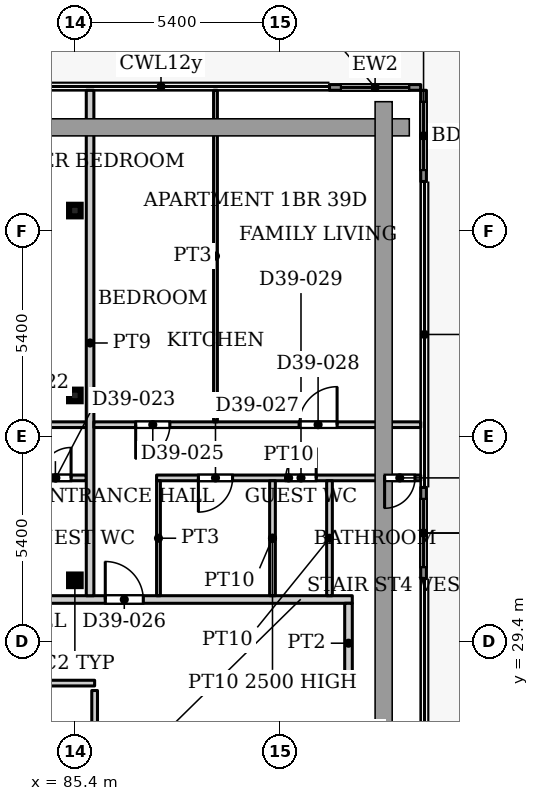
"""IFC4 building model, lengths in metres.
Left out: names, types, materials, properties, quantities, classifications, styles, units other than length and angle.
Written with IfcOpenShell. Run it as: python <this file> out.ifc"""

import sys

from ifc_helpers import new_model, si_unit, direction, frame, frame_2d, origin, origin_2d, place, context, subcontext, project, spatial, rectangle, hollow_rectangle, extrude, source, transform, mapped, element, fill, save


model = new_model("IFC4")
c1 = context("Model", 3, precision=1e-05, world=origin(), true_north=direction((0.0, 1.0)))
c2 = subcontext(c1, "Body", "Model", "MODEL_VIEW")
j1 = project(units=[si_unit("LENGTHUNIT", "METRE"), si_unit("PLANEANGLEUNIT", "RADIAN")], contexts=[c1])
p1 = place(None, origin())
s1 = spatial("IfcSite", under=j1, at=p1, CompositionType="ELEMENT")
p2 = place(p1, origin())
s2 = spatial("IfcBuilding", under=s1, at=p2, CompositionType="ELEMENT")
p3 = place(p2, frame((0.0, 0.0, 168.2)))
s3 = spatial("IfcBuildingStorey", under=s2, at=p3, CompositionType="ELEMENT", Elevation=168.2)
for number, where, z_axis, x_axis in (
    (1, (85.4, 31.005, 0.0), (0.0, 0.0, 1.0), (1.0, 0.0, 0.0)),
    (2, (85.4, 35.87, 0.0), (0.0, 0.0, 1.0), (1.0, 0.0, 0.0)),
    (3, (85.4, 40.735, 0.0), (0.0, 0.0, 1.0), (1.0, 0.0, 0.0)),
):
    element("IfcColumn", number, at=place(p3, frame(where, z_axis=z_axis, x_axis=x_axis)), inside=s3, PredefinedType="COLUMN", context=c2, shape_type="SweptSolid", body=[
        extrude(hollow_rectangle(XDim=0.305, YDim=0.305, WallThickness=0.016, InnerFilletRadius=0.016, OuterFilletRadius=0.032, at=origin_2d()), origin(), (0.0, 0.0, 1.0), 3.9),
    ])
p4 = place(p3, frame((92.1, 43.975, 0.0), z_axis=(0.0, 0.0, 1.0), x_axis=(1.0, 0.0, 0.0)))
e4 = element("IfcWall", 4, at=p4, inside=s3, PredefinedType="SOLIDWALL", context=c2, shape_type="SweptSolid", body=[
    extrude(rectangle(XDim=2.4, YDim=0.15, at=frame_2d((1.2, 0.0))), origin(), (0.0, 0.0, 1.0), 3.75),
])
p5 = place(p4, frame((0.3, 0.0, 0.0)))
e5 = element("IfcOpeningElement", 5, at=p5, cuts=e4, PredefinedType="OPENING", context=c2, shape_type="SweptSolid", body=[
    extrude(rectangle(XDim=1.8, YDim=2.4, at=frame_2d((0.9, 1.2))), frame((0.0, 0.085, 0.0), z_axis=(0.0, -1.0, 0.0), x_axis=(1.0, 0.0, 0.0)), (0.0, 0.0, 1.0), 0.17),
])
p6 = place(p3, frame((94.575, 43.9, 0.0), z_axis=(0.0, 0.0, 1.0), x_axis=(0.0, -1.0, 0.0)))
e6 = element("IfcWall", 6, at=p6, inside=s3, PredefinedType="SOLIDWALL", context=c2, shape_type="SweptSolid", body=[
    extrude(rectangle(XDim=2.4, YDim=0.15, at=frame_2d((1.2, 0.0))), origin(), (0.0, 0.0, 1.0), 3.75),
])
p7 = place(p6, frame((0.3, 0.0, 0.0)))
e7 = element("IfcOpeningElement", 7, at=p7, cuts=e6, PredefinedType="OPENING", context=c2, shape_type="SweptSolid", body=[
    extrude(rectangle(XDim=1.8, YDim=2.4, at=frame_2d((0.9, 1.2))), frame((0.0, 0.085, 0.0), z_axis=(0.0, -1.0, 0.0), x_axis=(1.0, 0.0, 0.0)), (0.0, 0.0, 1.0), 0.17),
])
p8 = place(p3, frame((94.575, 33.449, 0.0), z_axis=(0.0, 0.0, 1.0), x_axis=(0.0, -1.0, 0.0)))
e8 = element("IfcWall", 8, at=p8, inside=s3, PredefinedType="SOLIDWALL", context=c2, shape_type="SweptSolid", body=[
    extrude(rectangle(XDim=2.4, YDim=0.15, at=frame_2d((1.2, 0.0))), origin(), (0.0, 0.0, 1.0), 3.75),
])
p9 = place(p8, frame((0.3, 0.0, 0.0)))
e9 = element("IfcOpeningElement", 9, at=p9, cuts=e8, PredefinedType="OPENING", context=c2, shape_type="SweptSolid", body=[
    extrude(rectangle(XDim=1.8, YDim=2.4, at=frame_2d((0.9, 1.2))), frame((0.0, 0.085, 0.0), z_axis=(0.0, -1.0, 0.0), x_axis=(1.0, 0.0, 0.0)), (0.0, 0.0, 1.0), 0.17),
])
p10 = place(p3, frame((81.441, 28.3, 0.0), z_axis=(0.0, 0.0, 1.0), x_axis=(1.0, 0.0, 0.0)))
e10 = element("IfcWall", 10, at=p10, inside=s3, PredefinedType="PARTITIONING", context=c2, shape_type="SweptSolid", body=[
    extrude(rectangle(XDim=4.479, YDim=0.15, at=frame_2d((2.24, 0.0))), origin(), (0.0, 0.0, 1.0), 3.9),
])
p11 = place(p10, frame((1.789, 0.0, 0.0)))
e11 = element("IfcOpeningElement", 11, at=p11, cuts=e10, PredefinedType="OPENING", context=c2, shape_type="SweptSolid", body=[
    extrude(rectangle(XDim=0.9, YDim=2.2, at=frame_2d((0.45, 1.1))), frame((0.0, 0.085, 0.0), z_axis=(0.0, -1.0, 0.0), x_axis=(1.0, 0.0, 0.0)), (0.0, 0.0, 1.0), 0.17),
])
p12 = place(p3, frame((85.92, 25.62, 0.0), z_axis=(0.0, 0.0, 1.0), x_axis=(0.0, 1.0, 0.0)))
e12 = element("IfcWall", 12, at=p12, inside=s3, PredefinedType="PARTITIONING", context=c2, shape_type="SweptSolid", body=[
    extrude(rectangle(XDim=2.485, YDim=0.15, at=frame_2d((1.242, 0.0))), origin(), (0.0, 0.0, 1.0), 3.9),
])
p13 = place(p3, frame((53.549, 30.5, 0.0), z_axis=(0.0, 0.0, 1.0), x_axis=(1.0, 0.0, 0.0)))
e13 = element("IfcWall", 13, at=p13, inside=s3, PredefinedType="PARTITIONING", context=c2, shape_type="SweptSolid", body=[
    extrude(rectangle(XDim=39.151, YDim=0.2, at=frame_2d((19.575, 0.0))), origin(), (0.0, 0.0, 1.0), 3.6),
])
p14 = place(p13, frame((2.801, 0.0, 0.0)))
e14 = element("IfcOpeningElement", 14, at=p14, cuts=e13, PredefinedType="OPENING", context=c2, shape_type="SweptSolid", body=[
    extrude(rectangle(XDim=1.0, YDim=2.1, at=frame_2d((0.5, 1.05))), frame((0.0, 0.11, 0.0), z_axis=(0.0, -1.0, 0.0), x_axis=(1.0, 0.0, 0.0)), (0.0, 0.0, 1.0), 0.22),
])
p15 = place(p13, frame((9.851, 0.0, 0.0)))
e15 = element("IfcOpeningElement", 15, at=p15, cuts=e13, PredefinedType="OPENING", context=c2, shape_type="SweptSolid", body=[
    extrude(rectangle(XDim=1.0, YDim=2.1, at=frame_2d((0.5, 1.05))), frame((0.0, 0.11, 0.0), z_axis=(0.0, -1.0, 0.0), x_axis=(1.0, 0.0, 0.0)), (0.0, 0.0, 1.0), 0.22),
])
p16 = place(p13, frame((28.751, 0.0, 0.0)))
e16 = element("IfcOpeningElement", 16, at=p16, cuts=e13, PredefinedType="OPENING", context=c2, shape_type="SweptSolid", body=[
    extrude(rectangle(XDim=1.0, YDim=2.1, at=frame_2d((0.5, 1.05))), frame((0.0, 0.11, 0.0), z_axis=(0.0, -1.0, 0.0), x_axis=(1.0, 0.0, 0.0)), (0.0, 0.0, 1.0), 0.22),
])
p17 = place(p13, frame((32.651, 0.0, 0.0)))
e17 = element("IfcOpeningElement", 17, at=p17, cuts=e13, PredefinedType="OPENING", context=c2, shape_type="SweptSolid", body=[
    extrude(rectangle(XDim=1.0, YDim=2.1, at=frame_2d((0.5, 1.05))), frame((0.0, 0.11, 0.0), z_axis=(0.0, -1.0, 0.0), x_axis=(1.0, 0.0, 0.0)), (0.0, 0.0, 1.0), 0.22),
])
p18 = place(p3, frame((75.4, 35.1, 0.0), z_axis=(0.0, 0.0, 1.0), x_axis=(1.0, 0.0, 0.0)))
e18 = element("IfcWall", 18, at=p18, inside=s3, PredefinedType="PARTITIONING", context=c2, shape_type="SweptSolid", body=[
    extrude(rectangle(XDim=10.3, YDim=0.15, at=frame_2d((5.15, 0.0))), origin(), (0.0, 0.0, 1.0), 3.6),
])
p19 = place(p18, frame((5.3, 0.0, 0.0)))
e19 = element("IfcOpeningElement", 19, at=p19, cuts=e18, PredefinedType="OPENING", context=c2, shape_type="SweptSolid", body=[
    extrude(rectangle(XDim=0.9, YDim=2.1, at=frame_2d((0.45, 1.05))), frame((0.0, 0.085, 0.0), z_axis=(0.0, -1.0, 0.0), x_axis=(1.0, 0.0, 0.0)), (0.0, 0.0, 1.0), 0.17),
])
p20 = place(p18, frame((1.65, 0.0, 0.0)))
e20 = element("IfcOpeningElement", 20, at=p20, cuts=e18, PredefinedType="OPENING", context=c2, shape_type="SweptSolid", body=[
    extrude(rectangle(XDim=1.0, YDim=2.1, at=frame_2d((0.5, 1.05))), frame((0.0, 0.085, 0.0), z_axis=(0.0, -1.0, 0.0), x_axis=(1.0, 0.0, 0.0)), (0.0, 0.0, 1.0), 0.17),
])
p21 = place(p18, frame((8.3, 0.0, 0.0)))
e21 = element("IfcOpeningElement", 21, at=p21, cuts=e18, PredefinedType="OPENING", context=c2, shape_type="SweptSolid", body=[
    extrude(rectangle(XDim=0.9, YDim=2.1, at=frame_2d((0.45, 1.05))), frame((0.0, 0.085, 0.0), z_axis=(0.0, -1.0, 0.0), x_axis=(1.0, 0.0, 0.0)), (0.0, 0.0, 1.0), 0.17),
])
p22 = place(p3, frame((84.075, 33.7, 0.0), z_axis=(0.0, 0.0, 1.0), x_axis=(1.0, 0.0, 0.0)))
e22 = element("IfcWall", 22, at=p22, inside=s3, PredefinedType="PARTITIONING", context=c2, shape_type="SweptSolid", body=[
    extrude(rectangle(XDim=1.625, YDim=0.15, at=frame_2d((0.812, 0.0))), origin(), (0.0, 0.0, 1.0), 3.6),
])
p23 = place(p22, frame((0.425, 0.0, 0.0)))
e23 = element("IfcOpeningElement", 23, at=p23, cuts=e22, PredefinedType="OPENING", context=c2, shape_type="SweptSolid", body=[
    extrude(rectangle(XDim=0.8, YDim=2.1, at=frame_2d((0.4, 1.05))), frame((0.0, 0.085, 0.0), z_axis=(0.0, -1.0, 0.0), x_axis=(1.0, 0.0, 0.0)), (0.0, 0.0, 1.0), 0.17),
])
p24 = place(p3, frame((85.8, 30.6, 0.0), z_axis=(0.0, 0.0, 1.0), x_axis=(0.0, 1.0, 0.0)))
e24 = element("IfcWall", 24, at=p24, inside=s3, PredefinedType="PARTITIONING", context=c2, shape_type="SweptSolid", body=[
    extrude(rectangle(XDim=13.3, YDim=0.2, at=frame_2d((6.65, 0.0))), origin(), (0.0, 0.0, 1.0), 3.6),
])
p25 = place(p3, frame((85.9, 35.1, 0.0), z_axis=(0.0, 0.0, 1.0), x_axis=(1.0, 0.0, 0.0)))
e25 = element("IfcWall", 25, at=p25, inside=s3, PredefinedType="PARTITIONING", context=c2, shape_type="SweptSolid", body=[
    extrude(rectangle(XDim=8.6, YDim=0.15, at=frame_2d((4.3, 0.0))), origin(), (0.0, 0.0, 1.0), 3.6),
])
p26 = place(p25, frame((1.1, 0.0, 0.0)))
e26 = element("IfcOpeningElement", 26, at=p26, cuts=e25, PredefinedType="OPENING", context=c2, shape_type="SweptSolid", body=[
    extrude(rectangle(XDim=0.9, YDim=2.1, at=frame_2d((0.45, 1.05))), frame((0.0, 0.085, 0.0), z_axis=(0.0, -1.0, 0.0), x_axis=(1.0, 0.0, 0.0)), (0.0, 0.0, 1.0), 0.17),
])
p27 = place(p25, frame((5.4, 0.0, 0.0)))
e27 = element("IfcOpeningElement", 27, at=p27, cuts=e25, PredefinedType="OPENING", context=c2, shape_type="SweptSolid", body=[
    extrude(rectangle(XDim=1.0, YDim=2.1, at=frame_2d((0.5, 1.05))), frame((0.0, 0.085, 0.0), z_axis=(0.0, -1.0, 0.0), x_axis=(1.0, 0.0, 0.0)), (0.0, 0.0, 1.0), 0.17),
])
p28 = place(p3, frame((87.55, 33.7, 0.0), z_axis=(0.0, 0.0, 1.0), x_axis=(1.0, 0.0, 0.0)))
e28 = element("IfcWall", 28, at=p28, inside=s3, PredefinedType="PARTITIONING", context=c2, shape_type="SweptSolid", body=[
    extrude(rectangle(XDim=6.95, YDim=0.15, at=frame_2d((3.475, 0.0))), origin(), (0.0, 0.0, 1.0), 3.6),
])
p29 = place(p28, frame((6.0, 0.0, 0.0)))
e29 = element("IfcOpeningElement", 29, at=p29, cuts=e28, PredefinedType="OPENING", context=c2, shape_type="SweptSolid", body=[
    extrude(rectangle(XDim=0.8, YDim=2.1, at=frame_2d((0.4, 1.05))), frame((0.0, 0.085, 0.0), z_axis=(0.0, -1.0, 0.0), x_axis=(1.0, 0.0, 0.0)), (0.0, 0.0, 1.0), 0.17),
])
p30 = place(p28, frame((1.1, 0.0, 0.0)))
e30 = element("IfcOpeningElement", 30, at=p30, cuts=e28, PredefinedType="OPENING", context=c2, shape_type="SweptSolid", body=[
    extrude(rectangle(XDim=0.9, YDim=2.1, at=frame_2d((0.45, 1.05))), frame((0.0, 0.085, 0.0), z_axis=(0.0, -1.0, 0.0), x_axis=(1.0, 0.0, 0.0)), (0.0, 0.0, 1.0), 0.17),
])
p31 = place(p28, frame((3.4, 0.0, 0.0)))
e31 = element("IfcOpeningElement", 31, at=p31, cuts=e28, PredefinedType="OPENING", context=c2, shape_type="SweptSolid", body=[
    extrude(rectangle(XDim=0.8, YDim=2.1, at=frame_2d((0.4, 1.05))), frame((0.0, 0.085, 0.0), z_axis=(0.0, -1.0, 0.0), x_axis=(1.0, 0.0, 0.0)), (0.0, 0.0, 1.0), 0.17),
])
p32 = place(p3, frame((87.6, 30.6, 0.0), z_axis=(0.0, 0.0, 1.0), x_axis=(0.0, 1.0, 0.0)))
e32 = element("IfcWall", 32, at=p32, inside=s3, PredefinedType="PARTITIONING", context=c2, shape_type="SweptSolid", body=[
    extrude(rectangle(XDim=3.025, YDim=0.1, at=frame_2d((1.512, 0.0))), origin(), (0.0, 0.0, 1.0), 3.6),
])
p33 = place(p3, frame((89.1, 35.175, 0.0), z_axis=(0.0, 0.0, 1.0), x_axis=(0.0, 1.0, 0.0)))
e33 = element("IfcWall", 33, at=p33, inside=s3, PredefinedType="PARTITIONING", context=c2, shape_type="SweptSolid", body=[
    extrude(rectangle(XDim=8.725, YDim=0.1, at=frame_2d((4.362, 0.0))), origin(), (0.0, 0.0, 1.0), 3.6),
])
p34 = place(p3, frame((90.6, 30.6, 0.0), z_axis=(0.0, 0.0, 1.0), x_axis=(0.0, 1.0, 0.0)))
e34 = element("IfcWall", 34, at=p34, inside=s3, PredefinedType="PARTITIONING", context=c2, shape_type="SweptSolid", body=[
    extrude(rectangle(XDim=3.025, YDim=0.15, at=frame_2d((1.512, 0.0))), origin(), (0.0, 0.0, 1.0), 2.5),
])
p35 = place(p3, frame((92.1, 30.6, 0.0), z_axis=(0.0, 0.0, 1.0), x_axis=(0.0, 1.0, 0.0)))
e35 = element("IfcWall", 35, at=p35, inside=s3, PredefinedType="PARTITIONING", context=c2, shape_type="SweptSolid", body=[
    extrude(rectangle(XDim=3.025, YDim=0.15, at=frame_2d((1.512, 0.0))), origin(), (0.0, 0.0, 1.0), 3.6),
])
p36 = place(p3, frame((92.6, 28.3, 0.0), z_axis=(0.0, 0.0, 1.0), x_axis=(0.0, 1.0, 0.0)))
e36 = element("IfcWall", 36, at=p36, inside=s3, PredefinedType="PARTITIONING", context=c2, shape_type="SweptSolid", body=[
    extrude(rectangle(XDim=2.1, YDim=0.2, at=frame_2d((1.05, 0.0))), origin(), (0.0, 0.0, 1.0), 3.6),
])
m1 = source(origin(), c2, "Body", "SweptSolid", [
    extrude(rectangle(XDim=1.8, YDim=2.4, at=frame_2d((0.9, 1.2))), frame((0.0, 0.025, 0.0), z_axis=(0.0, -1.0, 0.0), x_axis=(1.0, 0.0, 0.0)), (0.0, 0.0, 1.0), 0.05),
])
p37 = place(p5, origin())
e37 = element("IfcDoor", 37, at=p37, inside=s3, OperationType="SLIDING_TO_LEFT", PredefinedType="DOOR", context=c2, shape_type="MappedRepresentation", body=[
    mapped(m1, transform((0.0, 0.0, 0.0), x_axis=(1.0, 0.0, 0.0), y_axis=(0.0, 1.0, 0.0), z_axis=(0.0, 0.0, 1.0), scale=1.0)),
])
fill(e5, e37)
p38 = place(p7, origin())
e38 = element("IfcDoor", 38, at=p38, inside=s3, OperationType="SLIDING_TO_LEFT", PredefinedType="DOOR", context=c2, shape_type="MappedRepresentation", body=[
    mapped(m1, transform((0.0, 0.0, 0.0), x_axis=(1.0, 0.0, 0.0), y_axis=(0.0, 1.0, 0.0), z_axis=(0.0, 0.0, 1.0), scale=1.0)),
])
fill(e7, e38)
p39 = place(p9, origin())
e39 = element("IfcDoor", 39, at=p39, inside=s3, OperationType="SLIDING_TO_LEFT", PredefinedType="DOOR", context=c2, shape_type="MappedRepresentation", body=[
    mapped(m1, transform((0.0, 0.0, 0.0), x_axis=(1.0, 0.0, 0.0), y_axis=(0.0, 1.0, 0.0), z_axis=(0.0, 0.0, 1.0), scale=1.0)),
])
fill(e9, e39)
m2 = source(origin(), c2, "Body", "SweptSolid", [
    extrude(rectangle(XDim=0.8, YDim=2.1, at=frame_2d((0.4, 1.05))), frame((0.0, 0.025, 0.0), z_axis=(0.0, -1.0, 0.0), x_axis=(1.0, 0.0, 0.0)), (0.0, 0.0, 1.0), 0.05),
])
p40 = place(p23, origin())
e40 = element("IfcDoor", 40, at=p40, inside=s3, OperationType="SINGLE_SWING_LEFT", PredefinedType="DOOR", context=c2, shape_type="MappedRepresentation", body=[
    mapped(m2, transform((0.0, 0.0, 0.0), x_axis=(1.0, 0.0, 0.0), y_axis=(0.0, 1.0, 0.0), z_axis=(0.0, 0.0, 1.0), scale=1.0)),
])
fill(e23, e40)
p41 = place(p29, origin())
e41 = element("IfcDoor", 41, at=p41, inside=s3, OperationType="SINGLE_SWING_RIGHT", PredefinedType="DOOR", context=c2, shape_type="MappedRepresentation", body=[
    mapped(m2, transform((0.0, 0.0, 0.0), x_axis=(1.0, 0.0, 0.0), y_axis=(0.0, 1.0, 0.0), z_axis=(0.0, 0.0, 1.0), scale=1.0)),
])
fill(e29, e41)
m3 = source(origin(), c2, "Body", "SweptSolid", [
    extrude(rectangle(XDim=0.9, YDim=2.1, at=frame_2d((0.45, 1.05))), frame((0.0, 0.025, 0.0), z_axis=(0.0, -1.0, 0.0), x_axis=(1.0, 0.0, 0.0)), (0.0, 0.0, 1.0), 0.05),
])
p42 = place(p26, origin())
e42 = element("IfcDoor", 42, at=p42, inside=s3, OperationType="SINGLE_SWING_RIGHT", PredefinedType="DOOR", context=c2, shape_type="MappedRepresentation", body=[
    mapped(m3, transform((0.0, 0.0, 0.0), x_axis=(1.0, 0.0, 0.0), y_axis=(0.0, 1.0, 0.0), z_axis=(0.0, 0.0, 1.0), scale=1.0)),
])
fill(e26, e42)
m4 = source(origin(), c2, "Body", "SweptSolid", [
    extrude(rectangle(XDim=1.0, YDim=2.1, at=frame_2d((0.5, 1.05))), frame((0.0, 0.025, 0.0), z_axis=(0.0, -1.0, 0.0), x_axis=(1.0, 0.0, 0.0)), (0.0, 0.0, 1.0), 0.05),
])
p43 = place(p17, origin())
e43 = element("IfcDoor", 43, at=p43, inside=s3, OperationType="SINGLE_SWING_LEFT", PredefinedType="DOOR", context=c2, shape_type="MappedRepresentation", body=[
    mapped(m4, transform((0.0, 0.0, 0.0), x_axis=(1.0, 0.0, 0.0), y_axis=(0.0, 1.0, 0.0), z_axis=(0.0, 0.0, 1.0), scale=1.0)),
])
fill(e17, e43)
p44 = place(p30, origin())
e44 = element("IfcDoor", 44, at=p44, inside=s3, OperationType="SINGLE_SWING_RIGHT", PredefinedType="DOOR", context=c2, shape_type="MappedRepresentation", body=[
    mapped(m3, transform((0.0, 0.0, 0.0), x_axis=(1.0, 0.0, 0.0), y_axis=(0.0, 1.0, 0.0), z_axis=(0.0, 0.0, 1.0), scale=1.0)),
])
fill(e30, e44)
m5 = source(origin(), c2, "Body", "SweptSolid", [
    extrude(rectangle(XDim=1.0, YDim=2.1, at=frame_2d((0.5, 1.05))), frame((0.0, 0.025, 0.0), z_axis=(0.0, -1.0, 0.0), x_axis=(1.0, 0.0, 0.0)), (0.0, 0.0, 1.0), 0.05),
])
p45 = place(p27, origin())
e45 = element("IfcDoor", 45, at=p45, inside=s3, OperationType="SINGLE_SWING_LEFT", PredefinedType="DOOR", context=c2, shape_type="MappedRepresentation", body=[
    mapped(m5, transform((0.0, 0.0, 0.0), x_axis=(1.0, 0.0, 0.0), y_axis=(0.0, 1.0, 0.0), z_axis=(0.0, 0.0, 1.0), scale=1.0)),
])
fill(e27, e45)
p46 = place(p31, origin())
e46 = element("IfcDoor", 46, at=p46, inside=s3, OperationType="SINGLE_SWING_LEFT", PredefinedType="DOOR", context=c2, shape_type="MappedRepresentation", body=[
    mapped(m2, transform((0.0, 0.0, 0.0), x_axis=(1.0, 0.0, 0.0), y_axis=(0.0, 1.0, 0.0), z_axis=(0.0, 0.0, 1.0), scale=1.0)),
])
fill(e31, e46)
save(model, sys.argv[1])
